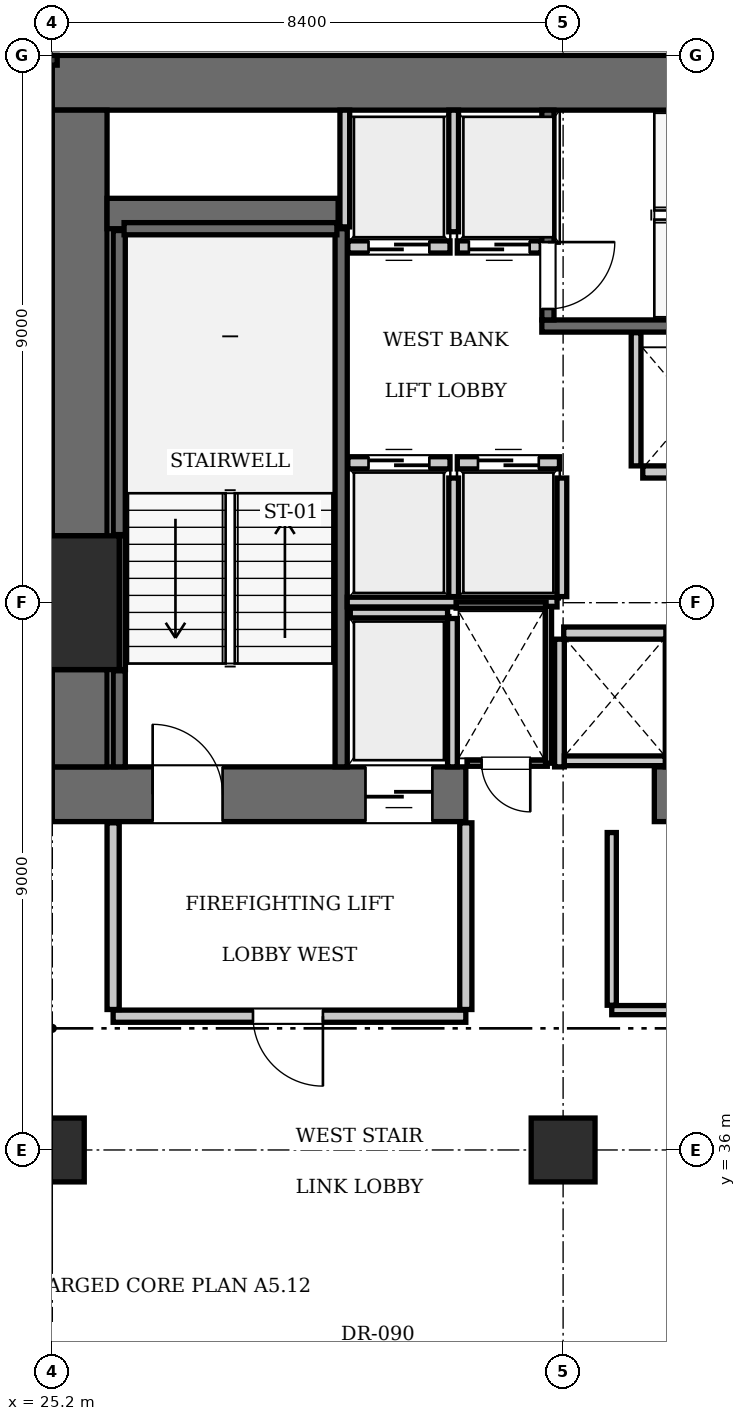
"""IFC4 building model, lengths in metres.
Left out: names, types, materials, properties, quantities, classifications, styles, units other than length and angle.
Written with IfcOpenShell. Run it as: python <this file> out.ifc"""

import sys

from ifc_helpers import new_model, si_unit, direction, frame, frame_2d, origin, origin_2d, place, context, subcontext, project, spatial, rectangle, extrude, element, fill, save


model = new_model("IFC4")
c1 = context("Model", 3, precision=1e-05, world=origin(), true_north=direction((0.0, 1.0)))
c2 = subcontext(c1, "Body", "Model", "MODEL_VIEW")
j1 = project(units=[si_unit("LENGTHUNIT", "METRE"), si_unit("PLANEANGLEUNIT", "RADIAN")], contexts=[c1])
p1 = place(None, origin())
s1 = spatial("IfcSite", under=j1, at=p1, CompositionType="ELEMENT")
p2 = place(p1, origin())
s2 = spatial("IfcBuilding", under=s1, at=p2, CompositionType="ELEMENT")
p3 = place(p2, frame((0.0, 0.0, 77.0)))
s3 = spatial("IfcBuildingStorey", under=s2, at=p3, CompositionType="ELEMENT", Elevation=77.0)
p4 = place(p3, frame((25.2, 45.0, 0.0), z_axis=(0.0, 0.0, 1.0), x_axis=(1.0, 0.0, 0.0)))
e1 = element("IfcColumn", 1, at=p4, inside=s3, PredefinedType="COLUMN", context=c2, shape_type="SweptSolid", body=[
    extrude(rectangle(XDim=2.2, YDim=2.2, at=origin_2d()), origin(), (0.0, 0.0, 1.0), 3.85),
])
p5 = place(p3, frame((25.2, 53.55, 0.0), z_axis=(0.0, 0.0, 1.0), x_axis=(1.0, 0.0, 0.0)))
e2 = element("IfcWall", 2, at=p5, inside=s3, PredefinedType="SHEAR", context=c2, shape_type="SweptSolid", body=[
    extrude(rectangle(XDim=25.2, YDim=0.9, at=frame_2d((12.6, 0.0))), origin(), (0.0, 0.0, 1.0), 3.85),
])
p6 = place(p3, frame((25.2, 41.85, 0.0), z_axis=(0.0, 0.0, 1.0), x_axis=(1.0, 0.0, 0.0)))
e3 = element("IfcWall", 3, at=p6, inside=s3, PredefinedType="SHEAR", context=c2, shape_type="SweptSolid", body=[
    extrude(rectangle(XDim=6.8, YDim=0.9, at=frame_2d((3.4, 0.0))), origin(), (0.0, 0.0, 1.0), 3.85),
])
p7 = place(p6, frame((1.65, 0.0, 0.0)))
e4 = element("IfcOpeningElement", 4, at=p7, cuts=e3, PredefinedType="OPENING", context=c2, shape_type="SweptSolid", body=[
    extrude(rectangle(XDim=1.15, YDim=2.15, at=frame_2d((0.575, 1.075))), frame((0.0, 0.46, 0.0), z_axis=(0.0, -1.0, 0.0), x_axis=(1.0, 0.0, 0.0)), (0.0, 0.0, 1.0), 0.92),
])
p8 = place(p6, frame((5.15, 0.0, 0.0)))
e5 = element("IfcOpeningElement", 5, at=p8, cuts=e3, PredefinedType="OPENING", context=c2, shape_type="SweptSolid", body=[
    extrude(rectangle(XDim=1.1, YDim=2.2, at=frame_2d((0.55, 1.1))), frame((0.0, 0.46, 0.0), z_axis=(0.0, -1.0, 0.0), x_axis=(1.0, 0.0, 0.0)), (0.0, 0.0, 1.0), 0.92),
])
p9 = place(p3, frame((35.1, 41.85, 0.0), z_axis=(0.0, 0.0, 1.0), x_axis=(1.0, 0.0, 0.0)))
e6 = element("IfcWall", 6, at=p9, inside=s3, PredefinedType="SHEAR", context=c2, shape_type="SweptSolid", body=[
    extrude(rectangle(XDim=5.4, YDim=0.9, at=frame_2d((2.7, 0.0))), origin(), (0.0, 0.0, 1.0), 3.85),
])
p10 = place(p3, frame((25.65, 42.3, 0.0), z_axis=(0.0, 0.0, 1.0), x_axis=(0.0, 1.0, 0.0)))
e7 = element("IfcWall", 7, at=p10, inside=s3, PredefinedType="SHEAR", context=c2, shape_type="SweptSolid", body=[
    extrude(rectangle(XDim=1.6, YDim=0.9, at=frame_2d((0.8, 0.0))), origin(), (0.0, 0.0, 1.0), 3.85),
])
p11 = place(p3, frame((25.65, 46.1, 0.0), z_axis=(0.0, 0.0, 1.0), x_axis=(0.0, 1.0, 0.0)))
e8 = element("IfcWall", 8, at=p11, inside=s3, PredefinedType="SHEAR", context=c2, shape_type="SweptSolid", body=[
    extrude(rectangle(XDim=7.0, YDim=0.9, at=frame_2d((3.5, 0.0))), origin(), (0.0, 0.0, 1.0), 3.85),
])
p12 = place(p3, frame((26.1, 51.4, 0.0), z_axis=(0.0, 0.0, 1.0), x_axis=(1.0, 0.0, 0.0)))
e9 = element("IfcWall", 9, at=p12, inside=s3, PredefinedType="SHEAR", context=c2, shape_type="SweptSolid", body=[
    extrude(rectangle(XDim=3.8, YDim=0.5, at=frame_2d((1.9, 0.0))), origin(), (0.0, 0.0, 1.0), 3.85),
])
for number, where, z_axis, x_axis in (
    (10, (25.2, 36.0, 0.0), (0.0, 0.0, 1.0), (1.0, 0.0, 0.0)),
    (11, (33.6, 36.0, 0.0), (0.0, 0.0, 1.0), (1.0, 0.0, 0.0)),
):
    element("IfcColumn", number, at=place(p3, frame(where, z_axis=z_axis, x_axis=x_axis)), inside=s3, PredefinedType="COLUMN", context=c2, shape_type="SweptSolid", body=[
        extrude(rectangle(XDim=1.05, YDim=1.05, at=origin_2d()), origin(), (0.0, 0.0, 1.0), 3.85),
    ])
p13 = place(p3, frame((29.95, 42.3, 0.0), z_axis=(0.0, 0.0, 1.0), x_axis=(0.0, 1.0, 0.0)))
e12 = element("IfcWall", 12, at=p13, inside=s3, PredefinedType="SOLIDWALL", context=c2, shape_type="SweptSolid", body=[
    extrude(rectangle(XDim=8.85, YDim=0.2, at=frame_2d((4.425, 0.0))), origin(), (0.0, 0.0, 1.0), 3.61),
])
p14 = place(p3, frame((26.3, 42.3, 0.0), z_axis=(0.0, 0.0, 1.0), x_axis=(0.0, 1.0, 0.0)))
e13 = element("IfcWall", 13, at=p14, inside=s3, PredefinedType="SOLIDWALL", context=c2, shape_type="SweptSolid", body=[
    extrude(rectangle(XDim=1.58, YDim=0.2, at=frame_2d((0.79, 0.0))), origin(), (0.0, 0.0, 1.0), 3.61),
])
p15 = place(p3, frame((26.3, 46.12, 0.0), z_axis=(0.0, 0.0, 1.0), x_axis=(0.0, 1.0, 0.0)))
e14 = element("IfcWall", 14, at=p15, inside=s3, PredefinedType="SOLIDWALL", context=c2, shape_type="SweptSolid", body=[
    extrude(rectangle(XDim=5.0, YDim=0.2, at=frame_2d((2.5, 0.0))), origin(), (0.0, 0.0, 1.0), 3.61),
])
p16 = place(p3, frame((26.38, 51.15, 0.0), z_axis=(0.0, 0.0, 1.0), x_axis=(1.0, 0.0, 0.0)))
e15 = element("IfcWall", 15, at=p16, inside=s3, PredefinedType="SOLIDWALL", context=c2, shape_type="SweptSolid", body=[
    extrude(rectangle(XDim=3.5, YDim=0.2, at=frame_2d((1.75, 0.0))), origin(), (0.0, 0.0, 1.0), 3.61),
])
p17 = place(p3, frame((26.352, 43.9, 0.0), z_axis=(0.0, 0.0, 1.0), x_axis=(0.0, 1.0, 0.0)))
e16 = element("IfcWall", 16, at=p17, inside=s3, PredefinedType="SOLIDWALL", context=c2, shape_type="SweptSolid", body=[
    extrude(rectangle(XDim=2.2, YDim=0.1, at=frame_2d((1.1, 0.0))), origin(), (0.0, 0.0, 1.0), 3.61),
])
p18 = place(p3, frame((33.25, 49.55, 0.0), z_axis=(0.0, 0.0, 1.0), x_axis=(1.0, 0.0, 0.0)))
e17 = element("IfcWall", 17, at=p18, inside=s3, PredefinedType="SOLIDWALL", context=c2, shape_type="SweptSolid", body=[
    extrude(rectangle(XDim=9.1, YDim=0.2, at=frame_2d((4.55, 0.0))), origin(), (0.0, 0.0, 1.0), 3.61),
])
p19 = place(p3, frame((33.35, 49.65, 0.0), z_axis=(0.0, 0.0, 1.0), x_axis=(0.0, 1.0, 0.0)))
e18 = element("IfcWall", 18, at=p19, inside=s3, PredefinedType="SOLIDWALL", context=c2, shape_type="SweptSolid", body=[
    extrude(rectangle(XDim=3.45, YDim=0.2, at=frame_2d((1.725, 0.0))), origin(), (0.0, 0.0, 1.0), 3.61),
])
p20 = place(p19, frame((0.18, 0.0, 0.0)))
e19 = element("IfcOpeningElement", 19, at=p20, cuts=e18, PredefinedType="OPENING", context=c2, shape_type="SweptSolid", body=[
    extrude(rectangle(XDim=1.1, YDim=2.15, at=frame_2d((0.55, 1.075))), frame((0.0, 0.11, 0.0), z_axis=(0.0, -1.0, 0.0), x_axis=(1.0, 0.0, 0.0)), (0.0, 0.0, 1.0), 0.22),
])
p21 = place(p3, frame((30.06, 47.3, 0.0), z_axis=(0.0, 0.0, 1.0), x_axis=(1.0, 0.0, 0.0)))
e20 = element("IfcWall", 20, at=p21, inside=s3, PredefinedType="SOLIDWALL", context=c2, shape_type="SweptSolid", body=[
    extrude(rectangle(XDim=1.68, YDim=0.2, at=frame_2d((0.84, 0.0))), origin(), (0.0, 0.0, 1.0), 3.61),
])
p22 = place(p21, frame((0.34, 0.0, 0.0)))
e21 = element("IfcOpeningElement", 21, at=p22, cuts=e20, PredefinedType="OPENING", context=c2, shape_type="SweptSolid", body=[
    extrude(rectangle(XDim=1.0, YDim=2.15, at=frame_2d((0.5, 1.075))), frame((0.0, 0.11, 0.0), z_axis=(0.0, -1.0, 0.0), x_axis=(1.0, 0.0, 0.0)), (0.0, 0.0, 1.0), 0.22),
])
p23 = place(p3, frame((31.86, 47.3, 0.0), z_axis=(0.0, 0.0, 1.0), x_axis=(1.0, 0.0, 0.0)))
e22 = element("IfcWall", 22, at=p23, inside=s3, PredefinedType="SOLIDWALL", context=c2, shape_type="SweptSolid", body=[
    extrude(rectangle(XDim=1.68, YDim=0.2, at=frame_2d((0.84, 0.0))), origin(), (0.0, 0.0, 1.0), 3.61),
])
p24 = place(p23, frame((0.34, 0.0, 0.0)))
e23 = element("IfcOpeningElement", 23, at=p24, cuts=e22, PredefinedType="OPENING", context=c2, shape_type="SweptSolid", body=[
    extrude(rectangle(XDim=1.0, YDim=2.15, at=frame_2d((0.5, 1.075))), frame((0.0, 0.11, 0.0), z_axis=(0.0, -1.0, 0.0), x_axis=(1.0, 0.0, 0.0)), (0.0, 0.0, 1.0), 0.22),
])
p25 = place(p3, frame((30.06, 50.85, 0.0), z_axis=(0.0, 0.0, 1.0), x_axis=(1.0, 0.0, 0.0)))
e24 = element("IfcWall", 24, at=p25, inside=s3, PredefinedType="SOLIDWALL", context=c2, shape_type="SweptSolid", body=[
    extrude(rectangle(XDim=1.68, YDim=0.2, at=frame_2d((0.84, 0.0))), origin(), (0.0, 0.0, 1.0), 3.61),
])
p26 = place(p25, frame((0.34, 0.0, 0.0)))
e25 = element("IfcOpeningElement", 25, at=p26, cuts=e24, PredefinedType="OPENING", context=c2, shape_type="SweptSolid", body=[
    extrude(rectangle(XDim=1.0, YDim=2.15, at=frame_2d((0.5, 1.075))), frame((0.0, 0.11, 0.0), z_axis=(0.0, -1.0, 0.0), x_axis=(1.0, 0.0, 0.0)), (0.0, 0.0, 1.0), 0.22),
])
p27 = place(p3, frame((31.86, 50.85, 0.0), z_axis=(0.0, 0.0, 1.0), x_axis=(1.0, 0.0, 0.0)))
e26 = element("IfcWall", 26, at=p27, inside=s3, PredefinedType="SOLIDWALL", context=c2, shape_type="SweptSolid", body=[
    extrude(rectangle(XDim=1.38, YDim=0.2, at=frame_2d((0.69, 0.0))), origin(), (0.0, 0.0, 1.0), 3.61),
])
p28 = place(p27, frame((0.19, 0.0, 0.0)))
e27 = element("IfcOpeningElement", 27, at=p28, cuts=e26, PredefinedType="OPENING", context=c2, shape_type="SweptSolid", body=[
    extrude(rectangle(XDim=1.0, YDim=2.15, at=frame_2d((0.5, 1.075))), frame((0.0, 0.11, 0.0), z_axis=(0.0, -1.0, 0.0), x_axis=(1.0, 0.0, 0.0)), (0.0, 0.0, 1.0), 0.22),
])
p29 = place(p3, frame((34.91, 47.15, 0.0), z_axis=(0.0, 0.0, 1.0), x_axis=(1.0, 0.0, 0.0)))
e28 = element("IfcWall", 28, at=p29, inside=s3, PredefinedType="SOLIDWALL", context=c2, shape_type="SweptSolid", body=[
    extrude(rectangle(XDim=1.68, YDim=0.2, at=frame_2d((0.84, 0.0))), origin(), (0.0, 0.0, 1.0), 3.61),
])
p30 = place(p3, frame((33.61, 44.5, 0.0), z_axis=(0.0, 0.0, 1.0), x_axis=(1.0, 0.0, 0.0)))
e29 = element("IfcWall", 29, at=p30, inside=s3, PredefinedType="SOLIDWALL", context=c2, shape_type="SweptSolid", body=[
    extrude(rectangle(XDim=1.68, YDim=0.2, at=frame_2d((0.84, 0.0))), origin(), (0.0, 0.0, 1.0), 3.61),
])
p31 = place(p3, frame((30.1, 44.83, 0.0), z_axis=(0.0, 0.0, 1.0), x_axis=(1.0, 0.0, 0.0)))
e30 = element("IfcWall", 30, at=p31, inside=s3, PredefinedType="SOLIDWALL", context=c2, shape_type="SweptSolid", body=[
    extrude(rectangle(XDim=1.6, YDim=0.16, at=frame_2d((0.8, 0.0))), origin(), (0.0, 0.0, 1.0), 3.61),
])
p32 = place(p3, frame((31.78, 42.3, 0.0), z_axis=(0.0, 0.0, 1.0), x_axis=(0.0, 1.0, 0.0)))
e31 = element("IfcWall", 31, at=p32, inside=s3, PredefinedType="SOLIDWALL", context=c2, shape_type="SweptSolid", body=[
    extrude(rectangle(XDim=2.44, YDim=0.16, at=frame_2d((1.22, 0.0))), origin(), (0.0, 0.0, 1.0), 3.61),
])
for number, where, z_axis, x_axis in (
    (32, (31.8, 45.1, 0.0), (0.0, 0.0, 1.0), (0.0, 1.0, 0.0)),
    (33, (33.58, 45.1, 0.0), (0.0, 0.0, 1.0), (0.0, 1.0, 0.0)),
):
    element("IfcWall", number, at=place(p3, frame(where, z_axis=z_axis, x_axis=x_axis)), inside=s3, PredefinedType="SOLIDWALL", context=c2, shape_type="SweptSolid", body=[
        extrude(rectangle(XDim=1.95, YDim=0.16, at=frame_2d((0.975, 0.0))), origin(), (0.0, 0.0, 1.0), 3.61),
    ])
p33 = place(p3, frame((30.05, 45.01, 0.0), z_axis=(0.0, 0.0, 1.0), x_axis=(1.0, 0.0, 0.0)))
e34 = element("IfcWall", 34, at=p33, inside=s3, PredefinedType="SOLIDWALL", context=c2, shape_type="SweptSolid", body=[
    extrude(rectangle(XDim=3.45, YDim=0.16, at=frame_2d((1.725, 0.0))), origin(), (0.0, 0.0, 1.0), 3.61),
])
p34 = place(p3, frame((30.01, 51.18, 0.0), z_axis=(0.0, 0.0, 1.0), x_axis=(0.0, 1.0, 0.0)))
e35 = element("IfcWall", 35, at=p34, inside=s3, PredefinedType="SOLIDWALL", context=c2, shape_type="SweptSolid", body=[
    extrude(rectangle(XDim=1.92, YDim=0.16, at=frame_2d((0.96, 0.0))), origin(), (0.0, 0.0, 1.0), 3.61),
])
p35 = place(p3, frame((31.8, 51.1, 0.0), z_axis=(0.0, 0.0, 1.0), x_axis=(0.0, 1.0, 0.0)))
e36 = element("IfcWall", 36, at=p35, inside=s3, PredefinedType="SOLIDWALL", context=c2, shape_type="SweptSolid", body=[
    extrude(rectangle(XDim=2.0, YDim=0.16, at=frame_2d((1.0, 0.0))), origin(), (0.0, 0.0, 1.0), 3.61),
])
p36 = place(p3, frame((34.8, 47.25, 0.0), z_axis=(0.0, 0.0, 1.0), x_axis=(0.0, 1.0, 0.0)))
e37 = element("IfcWall", 37, at=p36, inside=s3, PredefinedType="SOLIDWALL", context=c2, shape_type="SweptSolid", body=[
    extrude(rectangle(XDim=2.19, YDim=0.16, at=frame_2d((1.095, 0.0))), origin(), (0.0, 0.0, 1.0), 3.61),
])
for number, where, z_axis, x_axis in (
    (38, (33.54, 42.3, 0.0), (0.0, 0.0, 1.0), (0.0, 1.0, 0.0)),
    (39, (35.36, 42.3, 0.0), (0.0, 0.0, 1.0), (0.0, 1.0, 0.0)),
):
    element("IfcWall", number, at=place(p3, frame(where, z_axis=z_axis, x_axis=x_axis)), inside=s3, PredefinedType="SOLIDWALL", context=c2, shape_type="SweptSolid", body=[
        extrude(rectangle(XDim=2.1, YDim=0.16, at=frame_2d((1.05, 0.0))), origin(), (0.0, 0.0, 1.0), 3.61),
    ])
p37 = place(p3, frame((33.62, 42.4, 0.0), z_axis=(0.0, 0.0, 1.0), x_axis=(1.0, 0.0, 0.0)))
e40 = element("IfcWall", 40, at=p37, inside=s3, PredefinedType="SOLIDWALL", context=c2, shape_type="SweptSolid", body=[
    extrude(rectangle(XDim=1.66, YDim=0.16, at=frame_2d((0.83, 0.0))), origin(), (0.0, 0.0, 1.0), 3.61),
])
p38 = place(p3, frame((26.2, 38.2, 0.0), z_axis=(0.0, 0.0, 1.0), x_axis=(1.0, 0.0, 0.0)))
e41 = element("IfcWall", 41, at=p38, inside=s3, PredefinedType="PARTITIONING", context=c2, shape_type="SweptSolid", body=[
    extrude(rectangle(XDim=5.8, YDim=0.2, at=frame_2d((2.9, 0.0))), origin(), (0.0, 0.0, 1.0), 3.61),
])
p39 = place(p38, frame((2.3, 0.0, 0.0)))
e42 = element("IfcOpeningElement", 42, at=p39, cuts=e41, PredefinedType="OPENING", context=c2, shape_type="SweptSolid", body=[
    extrude(rectangle(XDim=1.15, YDim=2.15, at=frame_2d((0.575, 1.075))), frame((0.0, 0.11, 0.0), z_axis=(0.0, -1.0, 0.0), x_axis=(1.0, 0.0, 0.0)), (0.0, 0.0, 1.0), 0.22),
])
for number, where, z_axis, x_axis in (
    (43, (26.2, 38.31, 0.0), (0.0, 0.0, 1.0), (0.0, 1.0, 0.0)),
    (44, (32.0, 38.31, 0.0), (0.0, 0.0, 1.0), (0.0, 1.0, 0.0)),
):
    element("IfcWall", number, at=place(p3, frame(where, z_axis=z_axis, x_axis=x_axis)), inside=s3, PredefinedType="PARTITIONING", context=c2, shape_type="SweptSolid", body=[
        extrude(rectangle(XDim=3.07, YDim=0.2, at=frame_2d((1.535, 0.0))), origin(), (0.0, 0.0, 1.0), 3.61),
    ])
p40 = place(p3, frame((32.02, 42.36, 0.0), z_axis=(0.0, 0.0, 1.0), x_axis=(1.0, 0.0, 0.0)))
e45 = element("IfcWall", 45, at=p40, inside=s3, PredefinedType="PARTITIONING", context=c2, shape_type="SweptSolid", body=[
    extrude(rectangle(XDim=1.32, YDim=0.1, at=frame_2d((0.66, 0.0))), origin(), (0.0, 0.0, 1.0), 3.61),
])
p41 = place(p40, frame((0.24, 0.0, 0.0)))
e46 = element("IfcOpeningElement", 46, at=p41, cuts=e45, PredefinedType="OPENING", context=c2, shape_type="SweptSolid", body=[
    extrude(rectangle(XDim=0.8, YDim=2.05, at=frame_2d((0.4, 1.025))), frame((0.0, 0.06, 0.0), z_axis=(0.0, -1.0, 0.0), x_axis=(1.0, 0.0, 0.0)), (0.0, 0.0, 1.0), 0.12),
])
p42 = place(p3, frame((31.84, 44.96, 0.0), z_axis=(0.0, 0.0, 1.0), x_axis=(1.0, 0.0, 0.0)))
e47 = element("IfcWall", 47, at=p42, inside=s3, PredefinedType="PARTITIONING", context=c2, shape_type="SweptSolid", body=[
    extrude(rectangle(XDim=1.48, YDim=0.1, at=frame_2d((0.74, 0.0))), origin(), (0.0, 0.0, 1.0), 3.61),
])
p43 = place(p3, frame((33.36, 42.36, 0.0), z_axis=(0.0, 0.0, 1.0), x_axis=(0.0, 1.0, 0.0)))
e48 = element("IfcWall", 48, at=p43, inside=s3, PredefinedType="PARTITIONING", context=c2, shape_type="SweptSolid", body=[
    extrude(rectangle(XDim=2.58, YDim=0.1, at=frame_2d((1.29, 0.0))), origin(), (0.0, 0.0, 1.0), 3.61),
])
p44 = place(p3, frame((34.4, 38.3, 0.0), z_axis=(0.0, 0.0, 1.0), x_axis=(1.0, 0.0, 0.0)))
e49 = element("IfcWall", 49, at=p44, inside=s3, PredefinedType="PARTITIONING", context=c2, shape_type="SweptSolid", body=[
    extrude(rectangle(XDim=5.92, YDim=0.15, at=frame_2d((2.96, 0.0))), origin(), (0.0, 0.0, 1.0), 3.61),
])
p45 = place(p44, frame((2.4, 0.0, 0.0)))
e50 = element("IfcOpeningElement", 50, at=p45, cuts=e49, PredefinedType="OPENING", context=c2, shape_type="SweptSolid", body=[
    extrude(rectangle(XDim=0.9, YDim=2.1, at=frame_2d((0.45, 1.05))), frame((0.0, 0.085, 0.0), z_axis=(0.0, -1.0, 0.0), x_axis=(1.0, 0.0, 0.0)), (0.0, 0.0, 1.0), 0.17),
])
p46 = place(p3, frame((34.4, 38.38, 0.0), z_axis=(0.0, 0.0, 1.0), x_axis=(0.0, 1.0, 0.0)))
e51 = element("IfcWall", 51, at=p46, inside=s3, PredefinedType="PARTITIONING", context=c2, shape_type="SweptSolid", body=[
    extrude(rectangle(XDim=2.84, YDim=0.15, at=frame_2d((1.42, 0.0))), origin(), (0.0, 0.0, 1.0), 3.61),
])
p47 = place(p7, origin())
e52 = element("IfcDoor", 52, at=p47, inside=s3, OperationType="SINGLE_SWING_LEFT", PredefinedType="DOOR", context=c2, shape_type="SweptSolid", body=[
    extrude(rectangle(XDim=1.15, YDim=2.15, at=frame_2d((0.575, 1.075))), frame((0.0, 0.025, 0.0), z_axis=(0.0, -1.0, 0.0), x_axis=(1.0, 0.0, 0.0)), (0.0, 0.0, 1.0), 0.05),
])
fill(e4, e52)
p48 = place(p20, frame((1.1, 0.0, 0.0), z_axis=(0.0, 0.0, 1.0), x_axis=(-1.0, 0.0, 0.0)))
e53 = element("IfcDoor", 53, at=p48, inside=s3, OperationType="SINGLE_SWING_LEFT", PredefinedType="DOOR", context=c2, shape_type="SweptSolid", body=[
    extrude(rectangle(XDim=1.1, YDim=2.15, at=frame_2d((0.55, 1.075))), frame((0.0, 0.025, 0.0), z_axis=(0.0, -1.0, 0.0), x_axis=(1.0, 0.0, 0.0)), (0.0, 0.0, 1.0), 0.05),
])
fill(e19, e53)
p49 = place(p22, origin())
e54 = element("IfcDoor", 54, at=p49, inside=s3, OperationType="SLIDING_TO_LEFT", PredefinedType="DOOR", context=c2, shape_type="SweptSolid", body=[
    extrude(rectangle(XDim=1.0, YDim=2.15, at=frame_2d((0.5, 1.075))), frame((0.0, 0.025, 0.0), z_axis=(0.0, -1.0, 0.0), x_axis=(1.0, 0.0, 0.0)), (0.0, 0.0, 1.0), 0.05),
])
fill(e21, e54)
p50 = place(p24, origin())
e55 = element("IfcDoor", 55, at=p50, inside=s3, OperationType="SLIDING_TO_LEFT", PredefinedType="DOOR", context=c2, shape_type="SweptSolid", body=[
    extrude(rectangle(XDim=1.0, YDim=2.15, at=frame_2d((0.5, 1.075))), frame((0.0, 0.025, 0.0), z_axis=(0.0, -1.0, 0.0), x_axis=(1.0, 0.0, 0.0)), (0.0, 0.0, 1.0), 0.05),
])
fill(e23, e55)
p51 = place(p26, frame((1.0, 0.0, 0.0), z_axis=(0.0, 0.0, 1.0), x_axis=(-1.0, 0.0, 0.0)))
e56 = element("IfcDoor", 56, at=p51, inside=s3, OperationType="SLIDING_TO_LEFT", PredefinedType="DOOR", context=c2, shape_type="SweptSolid", body=[
    extrude(rectangle(XDim=1.0, YDim=2.15, at=frame_2d((0.5, 1.075))), frame((0.0, 0.025, 0.0), z_axis=(0.0, -1.0, 0.0), x_axis=(1.0, 0.0, 0.0)), (0.0, 0.0, 1.0), 0.05),
])
fill(e25, e56)
p52 = place(p28, frame((1.0, 0.0, 0.0), z_axis=(0.0, 0.0, 1.0), x_axis=(-1.0, 0.0, 0.0)))
e57 = element("IfcDoor", 57, at=p52, inside=s3, OperationType="SLIDING_TO_LEFT", PredefinedType="DOOR", context=c2, shape_type="SweptSolid", body=[
    extrude(rectangle(XDim=1.0, YDim=2.15, at=frame_2d((0.5, 1.075))), frame((0.0, 0.025, 0.0), z_axis=(0.0, -1.0, 0.0), x_axis=(1.0, 0.0, 0.0)), (0.0, 0.0, 1.0), 0.05),
])
fill(e27, e57)
p53 = place(p8, frame((1.1, 0.0, 0.0), z_axis=(0.0, 0.0, 1.0), x_axis=(-1.0, 0.0, 0.0)))
e58 = element("IfcDoor", 58, at=p53, inside=s3, OperationType="SLIDING_TO_LEFT", PredefinedType="DOOR", context=c2, shape_type="SweptSolid", body=[
    extrude(rectangle(XDim=1.1, YDim=2.2, at=frame_2d((0.55, 1.1))), frame((0.0, 0.025, 0.0), z_axis=(0.0, -1.0, 0.0), x_axis=(1.0, 0.0, 0.0)), (0.0, 0.0, 1.0), 0.05),
])
fill(e5, e58)
p54 = place(p39, frame((1.15, 0.0, 0.0), z_axis=(0.0, 0.0, 1.0), x_axis=(-1.0, 0.0, 0.0)))
e59 = element("IfcDoor", 59, at=p54, inside=s3, OperationType="SINGLE_SWING_LEFT", PredefinedType="DOOR", context=c2, shape_type="SweptSolid", body=[
    extrude(rectangle(XDim=1.15, YDim=2.15, at=frame_2d((0.575, 1.075))), frame((0.0, 0.025, 0.0), z_axis=(0.0, -1.0, 0.0), x_axis=(1.0, 0.0, 0.0)), (0.0, 0.0, 1.0), 0.05),
])
fill(e42, e59)
p55 = place(p41, frame((0.8, 0.0, 0.0), z_axis=(0.0, 0.0, 1.0), x_axis=(-1.0, 0.0, 0.0)))
e60 = element("IfcDoor", 60, at=p55, inside=s3, OperationType="SINGLE_SWING_LEFT", PredefinedType="DOOR", context=c2, shape_type="SweptSolid", body=[
    extrude(rectangle(XDim=0.8, YDim=2.05, at=frame_2d((0.4, 1.025))), frame((0.0, 0.025, 0.0), z_axis=(0.0, -1.0, 0.0), x_axis=(1.0, 0.0, 0.0)), (0.0, 0.0, 1.0), 0.05),
])
fill(e46, e60)
save(model, sys.argv[1])
